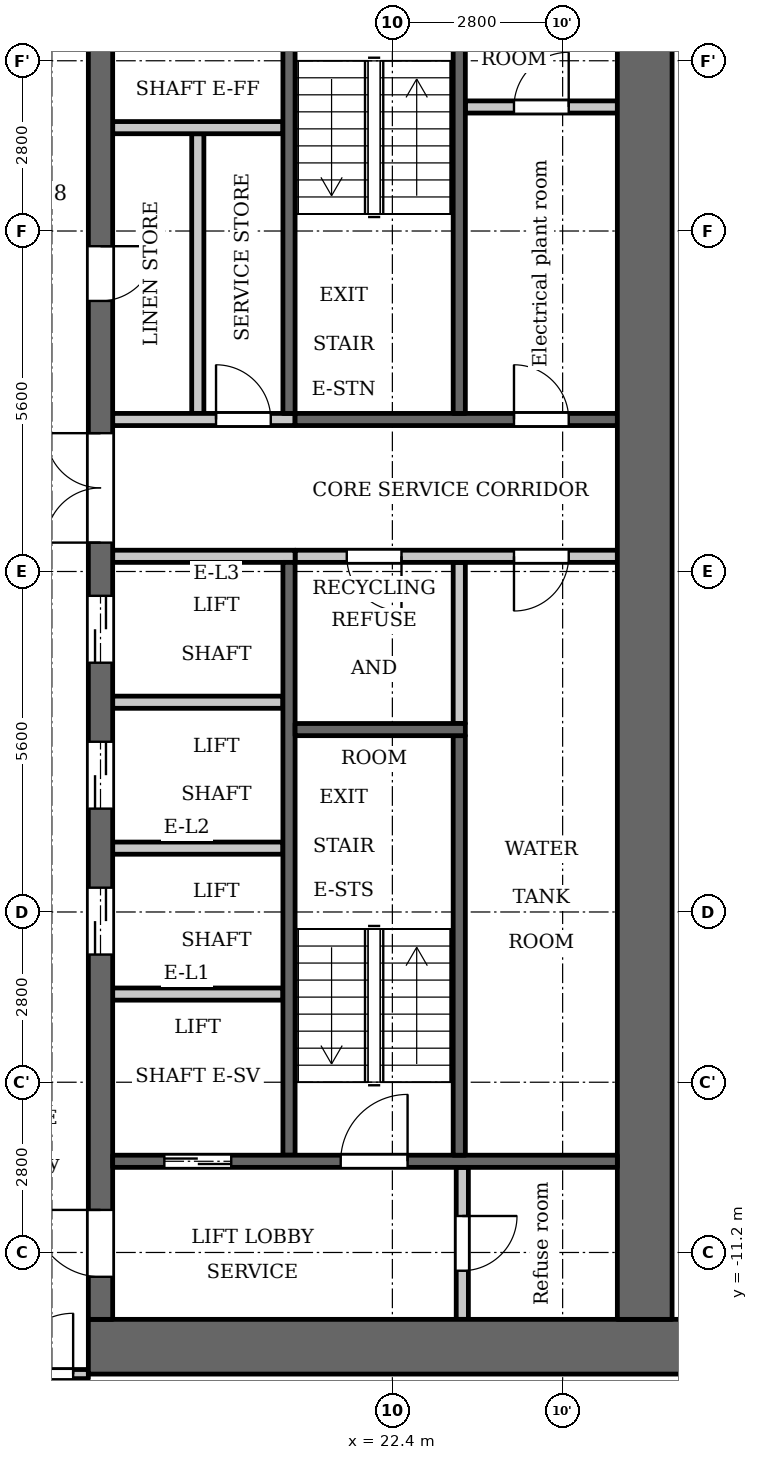
"""IFC4 building model, lengths in metres.
Left out: names, types, materials, properties, quantities, classifications, styles, units other than length and angle.
Written with IfcOpenShell. Run it as: python <this file> out.ifc"""

import sys

from ifc_helpers import new_model, si_unit, direction, frame, frame_2d, origin, place, context, subcontext, project, spatial, rectangle, extrude, element, fill, save


model = new_model("IFC4")
c1 = context("Model", 3, precision=1e-05, world=origin(), true_north=direction((0.0, 1.0)))
c2 = subcontext(c1, "Body", "Model", "MODEL_VIEW")
j1 = project(units=[si_unit("LENGTHUNIT", "METRE"), si_unit("PLANEANGLEUNIT", "RADIAN")], contexts=[c1])
p1 = place(None, origin())
s1 = spatial("IfcSite", under=j1, at=p1, CompositionType="ELEMENT")
p2 = place(p1, origin())
s2 = spatial("IfcBuilding", under=s1, at=p2, CompositionType="ELEMENT")
p3 = place(p2, frame((0.0, 0.0, 107.8)))
s3 = spatial("IfcBuildingStorey", under=s2, at=p3, CompositionType="ELEMENT", Elevation=107.8)
p4 = place(p3, frame((23.5, -2.5, 0.0), z_axis=(0.0, 0.0, 1.0), x_axis=(0.0, 1.0, 0.0)))
e1 = element("IfcWall", 1, at=p4, inside=s3, PredefinedType="PARTITIONING", context=c2, shape_type="SweptSolid", body=[
    extrude(rectangle(XDim=2.65, YDim=0.2, at=frame_2d((1.325, 0.0))), origin(), (0.0, 0.0, 1.0), 3.2),
])
p5 = place(p3, frame((20.7, 2.6, 0.0), z_axis=(0.0, 0.0, 1.0), x_axis=(0.0, 1.0, 0.0)))
e2 = element("IfcWall", 2, at=p5, inside=s3, PredefinedType="SHEAR", context=c2, shape_type="SweptSolid", body=[
    extrude(rectangle(XDim=7.0, YDim=0.2, at=frame_2d((3.5, 0.0))), origin(), (0.0, 0.0, 1.0), 3.2),
])
p6 = place(p3, frame((20.7, -9.6, 0.0), z_axis=(0.0, 0.0, 1.0), x_axis=(0.0, 1.0, 0.0)))
e3 = element("IfcWall", 3, at=p6, inside=s3, PredefinedType="SHEAR", context=c2, shape_type="SweptSolid", body=[
    extrude(rectangle(XDim=9.75, YDim=0.2, at=frame_2d((4.875, 0.0))), origin(), (0.0, 0.0, 1.0), 3.2),
])
p7 = place(p3, frame((20.8, 2.5, 0.0), z_axis=(0.0, 0.0, 1.0), x_axis=(1.0, 0.0, 0.0)))
e4 = element("IfcWall", 4, at=p7, inside=s3, PredefinedType="SHEAR", context=c2, shape_type="SweptSolid", body=[
    extrude(rectangle(XDim=5.3, YDim=0.2, at=frame_2d((2.65, 0.0))), origin(), (0.0, 0.0, 1.0), 3.2),
])
p8 = place(p7, frame((3.6, 0.0, 0.0)))
e5 = element("IfcOpeningElement", 5, at=p8, cuts=e4, PredefinedType="OPENING", context=c2, shape_type="SweptSolid", body=[
    extrude(rectangle(XDim=0.9, YDim=2.1, at=frame_2d((0.45, 1.05))), frame((0.0, 0.11, 0.0), z_axis=(0.0, -1.0, 0.0), x_axis=(1.0, 0.0, 0.0)), (0.0, 0.0, 1.0), 0.22),
])
p9 = place(p3, frame((20.8, 0.25, 0.0), z_axis=(0.0, 0.0, 1.0), x_axis=(1.0, 0.0, 0.0)))
e6 = element("IfcWall", 6, at=p9, inside=s3, PredefinedType="PARTITIONING", context=c2, shape_type="SweptSolid", body=[
    extrude(rectangle(XDim=5.3, YDim=0.2, at=frame_2d((2.65, 0.0))), origin(), (0.0, 0.0, 1.0), 3.2),
])
p10 = place(p9, frame((0.85, 0.0, 0.0)))
e7 = element("IfcOpeningElement", 7, at=p10, cuts=e6, PredefinedType="OPENING", context=c2, shape_type="SweptSolid", body=[
    extrude(rectangle(XDim=0.9, YDim=2.1, at=frame_2d((0.45, 1.05))), frame((0.0, 0.11, 0.0), z_axis=(0.0, -1.0, 0.0), x_axis=(1.0, 0.0, 0.0)), (0.0, 0.0, 1.0), 0.22),
])
p11 = place(p9, frame((3.6, 0.0, 0.0)))
e8 = element("IfcOpeningElement", 8, at=p11, cuts=e6, PredefinedType="OPENING", context=c2, shape_type="SweptSolid", body=[
    extrude(rectangle(XDim=0.9, YDim=2.1, at=frame_2d((0.45, 1.05))), frame((0.0, 0.11, 0.0), z_axis=(0.0, -1.0, 0.0), x_axis=(1.0, 0.0, 0.0)), (0.0, 0.0, 1.0), 0.22),
])
p12 = place(p3, frame((17.4, -12.75, 0.0), z_axis=(0.0, 0.0, 1.0), x_axis=(1.0, 0.0, 0.0)))
e9 = element("IfcWall", 9, at=p12, inside=s3, PredefinedType="SHEAR", context=c2, shape_type="SweptSolid", body=[
    extrude(rectangle(XDim=10.4, YDim=0.9, at=frame_2d((5.2, 0.0))), origin(), (0.0, 0.0, 1.0), 3.2),
])
p13 = place(p3, frame((19.2, 2.6, 0.0), z_axis=(0.0, 0.0, 1.0), x_axis=(0.0, 1.0, 0.0)))
e10 = element("IfcWall", 10, at=p13, inside=s3, PredefinedType="PARTITIONING", context=c2, shape_type="SweptSolid", body=[
    extrude(rectangle(XDim=4.6, YDim=0.2, at=frame_2d((2.3, 0.0))), origin(), (0.0, 0.0, 1.0), 3.2),
])
p14 = place(p3, frame((17.6, -12.3, 0.0), z_axis=(0.0, 0.0, 1.0), x_axis=(0.0, 1.0, 0.0)))
e11 = element("IfcWall", 11, at=p14, inside=s3, PredefinedType="SHEAR", context=c2, shape_type="SweptSolid", body=[
    extrude(rectangle(XDim=24.6, YDim=0.4, at=frame_2d((12.3, 0.0))), origin(), (0.0, 0.0, 1.0), 3.2),
])
p15 = place(p14, frame((6.0, 0.0, 0.0)))
e12 = element("IfcOpeningElement", 12, at=p15, cuts=e11, PredefinedType="OPENING", context=c2, shape_type="SweptSolid", body=[
    extrude(rectangle(XDim=1.1, YDim=2.1, at=frame_2d((0.55, 1.05))), frame((0.0, 0.21, 0.0), z_axis=(0.0, -1.0, 0.0), x_axis=(1.0, 0.0, 0.0)), (0.0, 0.0, 1.0), 0.42),
])
p16 = place(p14, frame((8.4, 0.0, 0.0)))
e13 = element("IfcOpeningElement", 13, at=p16, cuts=e11, PredefinedType="OPENING", context=c2, shape_type="SweptSolid", body=[
    extrude(rectangle(XDim=1.1, YDim=2.1, at=frame_2d((0.55, 1.05))), frame((0.0, 0.21, 0.0), z_axis=(0.0, -1.0, 0.0), x_axis=(1.0, 0.0, 0.0)), (0.0, 0.0, 1.0), 0.42),
])
p17 = place(p14, frame((10.8, 0.0, 0.0)))
e14 = element("IfcOpeningElement", 14, at=p17, cuts=e11, PredefinedType="OPENING", context=c2, shape_type="SweptSolid", body=[
    extrude(rectangle(XDim=1.1, YDim=2.1, at=frame_2d((0.55, 1.05))), frame((0.0, 0.21, 0.0), z_axis=(0.0, -1.0, 0.0), x_axis=(1.0, 0.0, 0.0)), (0.0, 0.0, 1.0), 0.42),
])
p18 = place(p14, frame((16.75, 0.0, 0.0)))
e15 = element("IfcOpeningElement", 15, at=p18, cuts=e11, PredefinedType="OPENING", context=c2, shape_type="SweptSolid", body=[
    extrude(rectangle(XDim=0.9, YDim=2.1, at=frame_2d((0.45, 1.05))), frame((0.0, 0.21, 0.0), z_axis=(0.0, -1.0, 0.0), x_axis=(1.0, 0.0, 0.0)), (0.0, 0.0, 1.0), 0.42),
])
p19 = place(p14, frame((22.8, 0.0, 0.0)))
e16 = element("IfcOpeningElement", 16, at=p19, cuts=e11, PredefinedType="OPENING", context=c2, shape_type="SweptSolid", body=[
    extrude(rectangle(XDim=1.1, YDim=2.1, at=frame_2d((0.55, 1.05))), frame((0.0, 0.21, 0.0), z_axis=(0.0, -1.0, 0.0), x_axis=(1.0, 0.0, 0.0)), (0.0, 0.0, 1.0), 0.42),
])
p20 = place(p14, frame((0.7, 0.0, 0.0)))
e17 = element("IfcOpeningElement", 17, at=p20, cuts=e11, PredefinedType="OPENING", context=c2, shape_type="SweptSolid", body=[
    extrude(rectangle(XDim=1.1, YDim=2.1, at=frame_2d((0.55, 1.05))), frame((0.0, 0.21, 0.0), z_axis=(0.0, -1.0, 0.0), x_axis=(1.0, 0.0, 0.0)), (0.0, 0.0, 1.0), 0.42),
])
p21 = place(p14, frame((12.775, 0.0, 0.0)))
e18 = element("IfcOpeningElement", 18, at=p21, cuts=e11, PredefinedType="OPENING", context=c2, shape_type="SweptSolid", body=[
    extrude(rectangle(XDim=1.8, YDim=2.1, at=frame_2d((0.9, 1.05))), frame((0.0, 0.21, 0.0), z_axis=(0.0, -1.0, 0.0), x_axis=(1.0, 0.0, 0.0)), (0.0, 0.0, 1.0), 0.42),
])
p22 = place(p3, frame((26.55, -12.3, 0.0), z_axis=(0.0, 0.0, 1.0), x_axis=(0.0, 1.0, 0.0)))
e19 = element("IfcWall", 19, at=p22, inside=s3, PredefinedType="SHEAR", context=c2, shape_type="SweptSolid", body=[
    extrude(rectangle(XDim=24.6, YDim=0.9, at=frame_2d((12.3, 0.0))), origin(), (0.0, 0.0, 1.0), 3.2),
])
p23 = place(p3, frame((23.55, -12.3, 0.0), z_axis=(0.0, 0.0, 1.0), x_axis=(0.0, 1.0, 0.0)))
e20 = element("IfcWall", 20, at=p23, inside=s3, PredefinedType="PARTITIONING", context=c2, shape_type="SweptSolid", body=[
    extrude(rectangle(XDim=2.5, YDim=0.2, at=frame_2d((1.25, 0.0))), origin(), (0.0, 0.0, 1.0), 3.2),
])
p24 = place(p23, frame((0.8, 0.0, 0.0)))
e21 = element("IfcOpeningElement", 21, at=p24, cuts=e20, PredefinedType="OPENING", context=c2, shape_type="SweptSolid", body=[
    extrude(rectangle(XDim=0.9, YDim=2.1, at=frame_2d((0.45, 1.05))), frame((0.0, 0.11, 0.0), z_axis=(0.0, -1.0, 0.0), x_axis=(1.0, 0.0, 0.0)), (0.0, 0.0, 1.0), 0.22),
])
p25 = place(p3, frame((23.6, 7.64, 0.0), z_axis=(0.0, 0.0, 1.0), x_axis=(1.0, 0.0, 0.0)))
e22 = element("IfcWall", 22, at=p25, inside=s3, PredefinedType="PARTITIONING", context=c2, shape_type="SweptSolid", body=[
    extrude(rectangle(XDim=2.5, YDim=0.2, at=frame_2d((1.25, 0.0))), origin(), (0.0, 0.0, 1.0), 3.2),
])
p26 = place(p25, frame((0.8, 0.0, 0.0)))
e23 = element("IfcOpeningElement", 23, at=p26, cuts=e22, PredefinedType="OPENING", context=c2, shape_type="SweptSolid", body=[
    extrude(rectangle(XDim=0.9, YDim=2.1, at=frame_2d((0.45, 1.05))), frame((0.0, 0.11, 0.0), z_axis=(0.0, -1.0, 0.0), x_axis=(1.0, 0.0, 0.0)), (0.0, 0.0, 1.0), 0.22),
])
p27 = place(p3, frame((17.8, -9.7, 0.0), z_axis=(0.0, 0.0, 1.0), x_axis=(1.0, 0.0, 0.0)))
e24 = element("IfcWall", 24, at=p27, inside=s3, PredefinedType="SHEAR", context=c2, shape_type="SweptSolid", body=[
    extrude(rectangle(XDim=8.3, YDim=0.2, at=frame_2d((4.15, 0.0))), origin(), (0.0, 0.0, 1.0), 3.2),
])
p28 = place(p27, frame((0.85, 0.0, 0.0)))
e25 = element("IfcOpeningElement", 25, at=p28, cuts=e24, PredefinedType="OPENING", context=c2, shape_type="SweptSolid", body=[
    extrude(rectangle(XDim=1.1, YDim=2.1, at=frame_2d((0.55, 1.05))), frame((0.0, 0.11, 0.0), z_axis=(0.0, -1.0, 0.0), x_axis=(1.0, 0.0, 0.0)), (0.0, 0.0, 1.0), 0.22),
])
p29 = place(p27, frame((3.75, 0.0, 0.0)))
e26 = element("IfcOpeningElement", 26, at=p29, cuts=e24, PredefinedType="OPENING", context=c2, shape_type="SweptSolid", body=[
    extrude(rectangle(XDim=1.1, YDim=2.1, at=frame_2d((0.55, 1.05))), frame((0.0, 0.11, 0.0), z_axis=(0.0, -1.0, 0.0), x_axis=(1.0, 0.0, 0.0)), (0.0, 0.0, 1.0), 0.22),
])
for number, where, z_axis, x_axis in (
    (27, (17.8, -6.95, 0.0), (0.0, 0.0, 1.0), (1.0, 0.0, 0.0)),
    (28, (17.8, -4.55, 0.0), (0.0, 0.0, 1.0), (1.0, 0.0, 0.0)),
    (29, (17.8, -2.15, 0.0), (0.0, 0.0, 1.0), (1.0, 0.0, 0.0)),
):
    element("IfcWall", number, at=place(p3, frame(where, z_axis=z_axis, x_axis=x_axis)), inside=s3, PredefinedType="PARTITIONING", context=c2, shape_type="SweptSolid", body=[
        extrude(rectangle(XDim=2.8, YDim=0.2, at=frame_2d((1.4, 0.0))), origin(), (0.0, 0.0, 1.0), 3.2),
    ])
p30 = place(p3, frame((17.8, 0.25, 0.0), z_axis=(0.0, 0.0, 1.0), x_axis=(1.0, 0.0, 0.0)))
e30 = element("IfcWall", 30, at=p30, inside=s3, PredefinedType="PARTITIONING", context=c2, shape_type="SweptSolid", body=[
    extrude(rectangle(XDim=3.0, YDim=0.2, at=frame_2d((1.5, 0.0))), origin(), (0.0, 0.0, 1.0), 3.2),
])
p31 = place(p3, frame((17.8, 2.5, 0.0), z_axis=(0.0, 0.0, 1.0), x_axis=(1.0, 0.0, 0.0)))
e31 = element("IfcWall", 31, at=p31, inside=s3, PredefinedType="PARTITIONING", context=c2, shape_type="SweptSolid", body=[
    extrude(rectangle(XDim=3.0, YDim=0.2, at=frame_2d((1.5, 0.0))), origin(), (0.0, 0.0, 1.0), 3.2),
])
p32 = place(p31, frame((1.7, 0.0, 0.0)))
e32 = element("IfcOpeningElement", 32, at=p32, cuts=e31, PredefinedType="OPENING", context=c2, shape_type="SweptSolid", body=[
    extrude(rectangle(XDim=0.9, YDim=2.1, at=frame_2d((0.45, 1.05))), frame((0.0, 0.11, 0.0), z_axis=(0.0, -1.0, 0.0), x_axis=(1.0, 0.0, 0.0)), (0.0, 0.0, 1.0), 0.22),
])
p33 = place(p3, frame((17.8, 7.3, 0.0), z_axis=(0.0, 0.0, 1.0), x_axis=(1.0, 0.0, 0.0)))
e33 = element("IfcWall", 33, at=p33, inside=s3, PredefinedType="PARTITIONING", context=c2, shape_type="SweptSolid", body=[
    extrude(rectangle(XDim=2.8, YDim=0.2, at=frame_2d((1.4, 0.0))), origin(), (0.0, 0.0, 1.0), 3.2),
])
p34 = place(p3, frame((23.5, 2.6, 0.0), z_axis=(0.0, 0.0, 1.0), x_axis=(0.0, 1.0, 0.0)))
e34 = element("IfcWall", 34, at=p34, inside=s3, PredefinedType="SHEAR", context=c2, shape_type="SweptSolid", body=[
    extrude(rectangle(XDim=7.0, YDim=0.2, at=frame_2d((3.5, 0.0))), origin(), (0.0, 0.0, 1.0), 3.2),
])
p35 = place(p3, frame((23.5, -9.6, 0.0), z_axis=(0.0, 0.0, 1.0), x_axis=(0.0, 1.0, 0.0)))
e35 = element("IfcWall", 35, at=p35, inside=s3, PredefinedType="SHEAR", context=c2, shape_type="SweptSolid", body=[
    extrude(rectangle(XDim=6.9, YDim=0.2, at=frame_2d((3.45, 0.0))), origin(), (0.0, 0.0, 1.0), 3.2),
])
p36 = place(p3, frame((20.8, -2.6, 0.0), z_axis=(0.0, 0.0, 1.0), x_axis=(1.0, 0.0, 0.0)))
e36 = element("IfcWall", 36, at=p36, inside=s3, PredefinedType="SHEAR", context=c2, shape_type="SweptSolid", body=[
    extrude(rectangle(XDim=2.8, YDim=0.2, at=frame_2d((1.4, 0.0))), origin(), (0.0, 0.0, 1.0), 3.2),
])
p37 = place(p3, frame((-17.4, -13.2, 0.0), z_axis=(0.0, 0.0, 1.0), x_axis=(1.0, 0.0, 0.0)))
e37 = element("IfcWall", 37, at=p37, inside=s3, PredefinedType="PARTITIONING", context=c2, shape_type="SweptSolid", body=[
    extrude(rectangle(XDim=34.8, YDim=0.15, at=frame_2d((17.4, 0.0))), origin(), (0.0, 0.0, 1.0), 3.2),
])
p38 = place(p37, frame((0.15, 0.0, 0.0)))
e38 = element("IfcOpeningElement", 38, at=p38, cuts=e37, PredefinedType="OPENING", context=c2, shape_type="SweptSolid", body=[
    extrude(rectangle(XDim=1.0, YDim=2.1, at=frame_2d((0.5, 1.05))), frame((0.0, 0.085, 0.0), z_axis=(0.0, -1.0, 0.0), x_axis=(1.0, 0.0, 0.0)), (0.0, 0.0, 1.0), 0.17),
])
p39 = place(p37, frame((33.55, 0.0, 0.0)))
e39 = element("IfcOpeningElement", 39, at=p39, cuts=e37, PredefinedType="OPENING", context=c2, shape_type="SweptSolid", body=[
    extrude(rectangle(XDim=1.0, YDim=2.1, at=frame_2d((0.5, 1.05))), frame((0.0, 0.085, 0.0), z_axis=(0.0, -1.0, 0.0), x_axis=(1.0, 0.0, 0.0)), (0.0, 0.0, 1.0), 0.17),
])
p40 = place(p37, frame((8.1, 0.0, 0.0)))
e40 = element("IfcOpeningElement", 40, at=p40, cuts=e37, PredefinedType="OPENING", context=c2, shape_type="SweptSolid", body=[
    extrude(rectangle(XDim=1.0, YDim=2.1, at=frame_2d((0.5, 1.05))), frame((0.0, 0.085, 0.0), z_axis=(0.0, -1.0, 0.0), x_axis=(1.0, 0.0, 0.0)), (0.0, 0.0, 1.0), 0.17),
])
p41 = place(p37, frame((12.45, 0.0, 0.0)))
e41 = element("IfcOpeningElement", 41, at=p41, cuts=e37, PredefinedType="OPENING", context=c2, shape_type="SweptSolid", body=[
    extrude(rectangle(XDim=1.0, YDim=2.1, at=frame_2d((0.5, 1.05))), frame((0.0, 0.085, 0.0), z_axis=(0.0, -1.0, 0.0), x_axis=(1.0, 0.0, 0.0)), (0.0, 0.0, 1.0), 0.17),
])
p42 = place(p37, frame((19.05, 0.0, 0.0)))
e42 = element("IfcOpeningElement", 42, at=p42, cuts=e37, PredefinedType="OPENING", context=c2, shape_type="SweptSolid", body=[
    extrude(rectangle(XDim=1.0, YDim=2.1, at=frame_2d((0.5, 1.05))), frame((0.0, 0.085, 0.0), z_axis=(0.0, -1.0, 0.0), x_axis=(1.0, 0.0, 0.0)), (0.0, 0.0, 1.0), 0.17),
])
p43 = place(p37, frame((24.9, 0.0, 0.0)))
e43 = element("IfcOpeningElement", 43, at=p43, cuts=e37, PredefinedType="OPENING", context=c2, shape_type="SweptSolid", body=[
    extrude(rectangle(XDim=1.0, YDim=2.1, at=frame_2d((0.5, 1.05))), frame((0.0, 0.085, 0.0), z_axis=(0.0, -1.0, 0.0), x_axis=(1.0, 0.0, 0.0)), (0.0, 0.0, 1.0), 0.17),
])
p44 = place(p28, origin())
e44 = element("IfcDoor", 44, at=p44, inside=s3, OperationType="DOUBLE_DOOR_SLIDING", PredefinedType="DOOR", context=c2, shape_type="SweptSolid", body=[
    extrude(rectangle(XDim=1.1, YDim=2.1, at=frame_2d((0.55, 1.05))), frame((0.0, 0.025, 0.0), z_axis=(0.0, -1.0, 0.0), x_axis=(1.0, 0.0, 0.0)), (0.0, 0.0, 1.0), 0.05),
])
fill(e25, e44)
p45 = place(p15, origin())
e45 = element("IfcDoor", 45, at=p45, inside=s3, OperationType="DOUBLE_DOOR_SLIDING", PredefinedType="DOOR", context=c2, shape_type="SweptSolid", body=[
    extrude(rectangle(XDim=1.1, YDim=2.1, at=frame_2d((0.55, 1.05))), frame((0.0, 0.025, 0.0), z_axis=(0.0, -1.0, 0.0), x_axis=(1.0, 0.0, 0.0)), (0.0, 0.0, 1.0), 0.05),
])
fill(e12, e45)
p46 = place(p16, origin())
e46 = element("IfcDoor", 46, at=p46, inside=s3, OperationType="DOUBLE_DOOR_SLIDING", PredefinedType="DOOR", context=c2, shape_type="SweptSolid", body=[
    extrude(rectangle(XDim=1.1, YDim=2.1, at=frame_2d((0.55, 1.05))), frame((0.0, 0.025, 0.0), z_axis=(0.0, -1.0, 0.0), x_axis=(1.0, 0.0, 0.0)), (0.0, 0.0, 1.0), 0.05),
])
fill(e13, e46)
p47 = place(p17, origin())
e47 = element("IfcDoor", 47, at=p47, inside=s3, OperationType="DOUBLE_DOOR_SLIDING", PredefinedType="DOOR", context=c2, shape_type="SweptSolid", body=[
    extrude(rectangle(XDim=1.1, YDim=2.1, at=frame_2d((0.55, 1.05))), frame((0.0, 0.025, 0.0), z_axis=(0.0, -1.0, 0.0), x_axis=(1.0, 0.0, 0.0)), (0.0, 0.0, 1.0), 0.05),
])
fill(e14, e47)
p48 = place(p18, origin())
e48 = element("IfcDoor", 48, at=p48, inside=s3, OperationType="SINGLE_SWING_RIGHT", PredefinedType="DOOR", context=c2, shape_type="SweptSolid", body=[
    extrude(rectangle(XDim=0.9, YDim=2.1, at=frame_2d((0.45, 1.05))), frame((0.0, 0.025, 0.0), z_axis=(0.0, -1.0, 0.0), x_axis=(1.0, 0.0, 0.0)), (0.0, 0.0, 1.0), 0.05),
])
fill(e15, e48)
p49 = place(p32, origin())
e49 = element("IfcDoor", 49, at=p49, inside=s3, OperationType="SINGLE_SWING_RIGHT", PredefinedType="DOOR", context=c2, shape_type="SweptSolid", body=[
    extrude(rectangle(XDim=0.9, YDim=2.1, at=frame_2d((0.45, 1.05))), frame((0.0, 0.025, 0.0), z_axis=(0.0, -1.0, 0.0), x_axis=(1.0, 0.0, 0.0)), (0.0, 0.0, 1.0), 0.05),
])
fill(e32, e49)
p50 = place(p20, origin())
e50 = element("IfcDoor", 50, at=p50, inside=s3, OperationType="SINGLE_SWING_LEFT", PredefinedType="DOOR", context=c2, shape_type="SweptSolid", body=[
    extrude(rectangle(XDim=1.1, YDim=2.1, at=frame_2d((0.55, 1.05))), frame((0.0, 0.025, 0.0), z_axis=(0.0, -1.0, 0.0), x_axis=(1.0, 0.0, 0.0)), (0.0, 0.0, 1.0), 0.05),
])
fill(e17, e50)
p51 = place(p24, origin())
e51 = element("IfcDoor", 51, at=p51, inside=s3, OperationType="SINGLE_SWING_RIGHT", PredefinedType="DOOR", context=c2, shape_type="SweptSolid", body=[
    extrude(rectangle(XDim=0.9, YDim=2.1, at=frame_2d((0.45, 1.05))), frame((0.0, 0.025, 0.0), z_axis=(0.0, -1.0, 0.0), x_axis=(1.0, 0.0, 0.0)), (0.0, 0.0, 1.0), 0.05),
])
fill(e21, e51)
p52 = place(p29, origin())
e52 = element("IfcDoor", 52, at=p52, inside=s3, OperationType="SINGLE_SWING_LEFT", PredefinedType="DOOR", context=c2, shape_type="SweptSolid", body=[
    extrude(rectangle(XDim=1.1, YDim=2.1, at=frame_2d((0.55, 1.05))), frame((0.0, 0.025, 0.0), z_axis=(0.0, -1.0, 0.0), x_axis=(1.0, 0.0, 0.0)), (0.0, 0.0, 1.0), 0.05),
])
fill(e26, e52)
p53 = place(p21, origin())
e53 = element("IfcDoor", 53, at=p53, inside=s3, OperationType="DOUBLE_DOOR_SINGLE_SWING", PredefinedType="DOOR", context=c2, shape_type="SweptSolid", body=[
    extrude(rectangle(XDim=1.8, YDim=2.1, at=frame_2d((0.9, 1.05))), frame((0.0, 0.025, 0.0), z_axis=(0.0, -1.0, 0.0), x_axis=(1.0, 0.0, 0.0)), (0.0, 0.0, 1.0), 0.05),
])
fill(e18, e53)
p54 = place(p10, origin())
e54 = element("IfcDoor", 54, at=p54, inside=s3, OperationType="SINGLE_SWING_RIGHT", PredefinedType="DOOR", context=c2, shape_type="SweptSolid", body=[
    extrude(rectangle(XDim=0.9, YDim=2.1, at=frame_2d((0.45, 1.05))), frame((0.0, 0.025, 0.0), z_axis=(0.0, -1.0, 0.0), x_axis=(1.0, 0.0, 0.0)), (0.0, 0.0, 1.0), 0.05),
])
fill(e7, e54)
p55 = place(p11, origin())
e55 = element("IfcDoor", 55, at=p55, inside=s3, OperationType="SINGLE_SWING_LEFT", PredefinedType="DOOR", context=c2, shape_type="SweptSolid", body=[
    extrude(rectangle(XDim=0.9, YDim=2.1, at=frame_2d((0.45, 1.05))), frame((0.0, 0.025, 0.0), z_axis=(0.0, -1.0, 0.0), x_axis=(1.0, 0.0, 0.0)), (0.0, 0.0, 1.0), 0.05),
])
fill(e8, e55)
p56 = place(p26, origin())
e56 = element("IfcDoor", 56, at=p56, inside=s3, OperationType="SINGLE_SWING_LEFT", PredefinedType="DOOR", context=c2, shape_type="SweptSolid", body=[
    extrude(rectangle(XDim=0.9, YDim=2.1, at=frame_2d((0.45, 1.05))), frame((0.0, 0.025, 0.0), z_axis=(0.0, -1.0, 0.0), x_axis=(1.0, 0.0, 0.0)), (0.0, 0.0, 1.0), 0.05),
])
fill(e23, e56)
p57 = place(p8, origin())
e57 = element("IfcDoor", 57, at=p57, inside=s3, OperationType="SINGLE_SWING_RIGHT", PredefinedType="DOOR", context=c2, shape_type="SweptSolid", body=[
    extrude(rectangle(XDim=0.9, YDim=2.1, at=frame_2d((0.45, 1.05))), frame((0.0, 0.025, 0.0), z_axis=(0.0, -1.0, 0.0), x_axis=(1.0, 0.0, 0.0)), (0.0, 0.0, 1.0), 0.05),
])
fill(e5, e57)
p58 = place(p39, origin())
e58 = element("IfcDoor", 58, at=p58, inside=s3, OperationType="SINGLE_SWING_LEFT", PredefinedType="DOOR", context=c2, shape_type="SweptSolid", body=[
    extrude(rectangle(XDim=1.0, YDim=2.1, at=frame_2d((0.5, 1.05))), frame((0.0, 0.025, 0.0), z_axis=(0.0, -1.0, 0.0), x_axis=(1.0, 0.0, 0.0)), (0.0, 0.0, 1.0), 0.05),
])
fill(e39, e58)
save(model, sys.argv[1])
